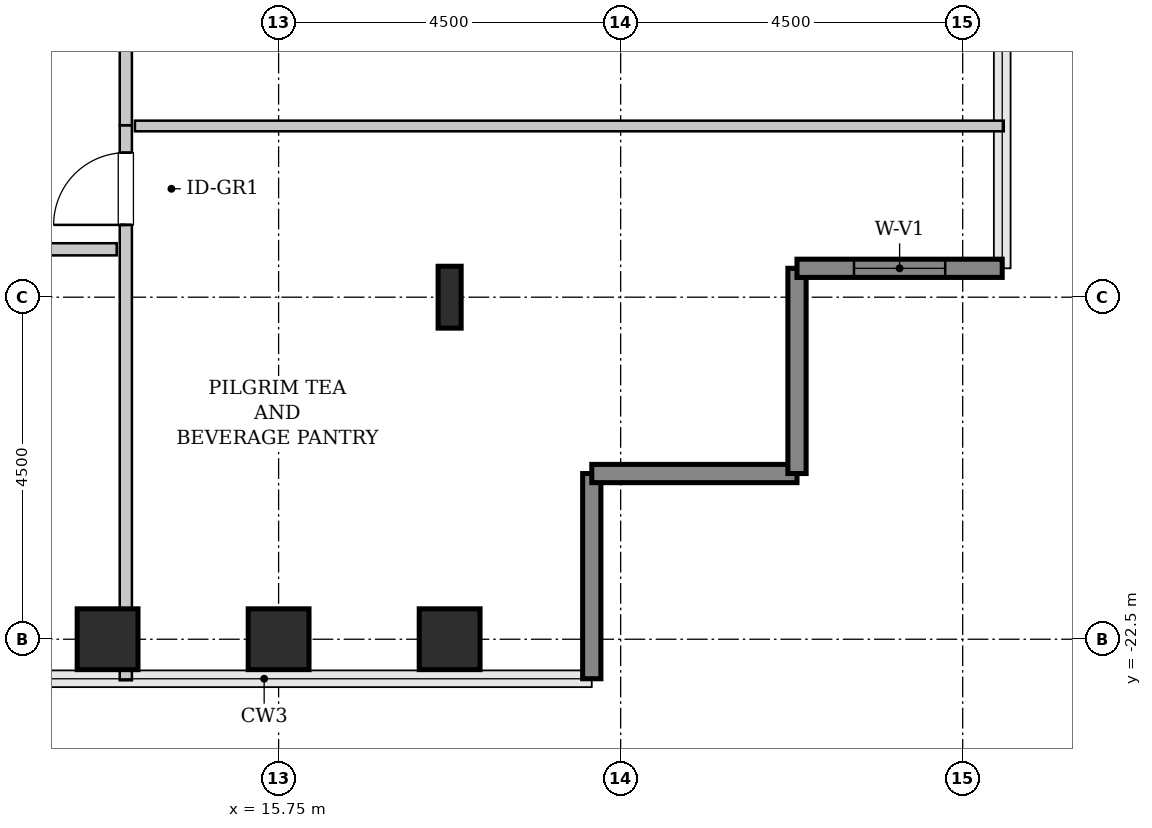
"""IFC4 building model, lengths in metres.
Left out: names, types, materials, properties, quantities, classifications, styles, units other than length and angle.
Written with IfcOpenShell. Run it as: python <this file> out.ifc"""

import sys

from ifc_helpers import new_model, si_unit, direction, frame, frame_2d, origin, origin_2d, place, context, subcontext, project, spatial, rectangle, hollow_rectangle, i_section, extrude, source, transform, mapped, element, fill, save


model = new_model("IFC4")
c1 = context("Model", 3, precision=1e-05, world=origin(), true_north=direction((0.0, 1.0)))
c2 = subcontext(c1, "Body", "Model", "MODEL_VIEW")
j1 = project(units=[si_unit("LENGTHUNIT", "METRE"), si_unit("PLANEANGLEUNIT", "RADIAN")], contexts=[c1])
p1 = place(None, origin())
s1 = spatial("IfcSite", under=j1, at=p1, CompositionType="ELEMENT")
p2 = place(p1, origin())
s2 = spatial("IfcBuilding", under=s1, at=p2, CompositionType="ELEMENT")
p3 = place(p2, frame((0.0, 0.0, 171.6)))
s3 = spatial("IfcBuildingStorey", under=s2, at=p3, CompositionType="ELEMENT", Elevation=171.6)
m1 = source(origin(), c2, "Body", "SweptSolid", [
    extrude(hollow_rectangle(XDim=0.8, YDim=0.8, WallThickness=0.04, InnerFilletRadius=0.04, OuterFilletRadius=0.08, at=origin_2d()), origin(), (0.0, 0.0, 1.0), 3.8),
])
for number, where, z_axis, x_axis in (
    (1, (13.5, -22.5, 0.0), (0.0, 0.0, 1.0), (1.0, 0.0, 0.0)),
    (2, (15.75, -22.5, 0.0), (0.0, 0.0, 1.0), (1.0, 0.0, 0.0)),
    (3, (18.0, -22.5, 0.0), (0.0, 0.0, 1.0), (1.0, 0.0, 0.0)),
):
    element("IfcColumn", number, at=place(p3, frame(where, z_axis=z_axis, x_axis=x_axis)), inside=s3, PredefinedType="COLUMN", context=c2, shape_type="MappedRepresentation", body=[
        mapped(m1, transform((0.0, 0.0, 0.0), x_axis=(1.0, 0.0, 0.0), y_axis=(0.0, 1.0, 0.0), z_axis=(0.0, 0.0, 1.0), scale=1.0)),
    ])
m2 = source(origin(), c2, "Body", "SweptSolid", [
    extrude(i_section(OverallWidth=0.303, OverallDepth=0.814, WebThickness=0.021, FlangeThickness=0.04, FilletRadius=0.03, at=origin_2d()), origin(), (0.0, 0.0, 1.0), 3.8),
])
p4 = place(p3, frame((18.0, -18.0, 0.0), z_axis=(0.0, 0.0, 1.0), x_axis=(1.0, 0.0, 0.0)))
e4 = element("IfcColumn", 4, at=p4, inside=s3, PredefinedType="COLUMN", context=c2, shape_type="MappedRepresentation", body=[
    mapped(m2, transform((0.0, 0.0, 0.0), x_axis=(1.0, 0.0, 0.0), y_axis=(0.0, 1.0, 0.0), z_axis=(0.0, 0.0, 1.0), scale=1.0)),
])
m3 = source(origin(), c2, "Body", "SweptSolid", [
    extrude(rectangle(XDim=2.7, YDim=0.24, at=frame_2d((1.35, 0.0))), origin(), (0.0, 0.0, 1.0), 3.55),
])
for number, where, z_axis, x_axis in (
    (5, (19.87, -23.02, 0.0), (0.0, 0.0, 1.0), (0.0, 1.0, 0.0)),
    (6, (19.87, -20.32, 0.0), (0.0, 0.0, 1.0), (1.0, 0.0, 0.0)),
    (7, (22.57, -20.32, 0.0), (0.0, 0.0, 1.0), (0.0, 1.0, 0.0)),
):
    element("IfcWall", number, at=place(p3, frame(where, z_axis=z_axis, x_axis=x_axis)), inside=s3, PredefinedType="SHEAR", context=c2, shape_type="MappedRepresentation", body=[
        mapped(m3, transform((0.0, 0.0, 0.0), x_axis=(1.0, 0.0, 0.0), y_axis=(0.0, 1.0, 0.0), z_axis=(0.0, 0.0, 1.0), scale=1.0)),
    ])
p5 = place(p3, frame((22.57, -17.62, 0.0), z_axis=(0.0, 0.0, 1.0), x_axis=(1.0, 0.0, 0.0)))
e8 = element("IfcWall", 8, at=p5, inside=s3, PredefinedType="SHEAR", context=c2, shape_type="MappedRepresentation", body=[
    mapped(m3, transform((0.0, 0.0, 0.0), x_axis=(1.0, 0.0, 0.0), y_axis=(0.0, 1.0, 0.0), z_axis=(0.0, 0.0, 1.0), scale=1.0)),
])
p6 = place(p5, frame((0.75, 0.0, 0.85)))
e9 = element("IfcOpeningElement", 9, at=p6, cuts=e8, PredefinedType="OPENING", context=c2, shape_type="SweptSolid", body=[
    extrude(rectangle(XDim=1.2, YDim=1.8, at=frame_2d((0.6, 0.9))), frame((0.0, 0.13, 0.0), z_axis=(0.0, -1.0, 0.0), x_axis=(1.0, 0.0, 0.0)), (0.0, 0.0, 1.0), 0.26),
])
m4 = source(origin(), c2, "Body", "SweptSolid", [
    extrude(rectangle(XDim=7.302, YDim=0.16, at=frame_2d((3.651, 0.0))), origin(), (0.0, 0.0, 1.0), 3.535),
])
p7 = place(p3, frame((13.74, -23.04, 0.0), z_axis=(0.0, 0.0, 1.0), x_axis=(0.0, 1.0, 0.0)))
e10 = element("IfcWall", 10, at=p7, inside=s3, PredefinedType="PARTITIONING", context=c2, shape_type="MappedRepresentation", body=[
    mapped(m4, transform((0.0, 0.0, 0.0), x_axis=(1.0, 0.0, 0.0), y_axis=(0.0, 1.0, 0.0), z_axis=(0.0, 0.0, 1.0), scale=1.0)),
])
p8 = place(p7, frame((5.991, 0.0, 0.0)))
e11 = element("IfcOpeningElement", 11, at=p8, cuts=e10, PredefinedType="OPENING", context=c2, shape_type="SweptSolid", body=[
    extrude(rectangle(XDim=0.95, YDim=2.1, at=frame_2d((0.475, 1.05))), frame((0.0, 0.09, 0.0), z_axis=(0.0, -1.0, 0.0), x_axis=(1.0, 0.0, 0.0)), (0.0, 0.0, 1.0), 0.18),
])
m5 = source(origin(), c2, "Body", "SweptSolid", [
    extrude(rectangle(XDim=11.43, YDim=0.14, at=frame_2d((5.715, 0.0))), origin(), (0.0, 0.0, 1.0), 3.535),
])
p9 = place(p3, frame((13.86, -15.748, 0.0), z_axis=(0.0, 0.0, 1.0), x_axis=(1.0, 0.0, 0.0)))
e12 = element("IfcWall", 12, at=p9, inside=s3, PredefinedType="PARTITIONING", context=c2, shape_type="MappedRepresentation", body=[
    mapped(m5, transform((0.0, 0.0, 0.0), x_axis=(1.0, 0.0, 0.0), y_axis=(0.0, 1.0, 0.0), z_axis=(0.0, 0.0, 1.0), scale=1.0)),
])
m6 = source(origin(), c2, "Body", "SweptSolid", [
    extrude(rectangle(XDim=7.242, YDim=0.16, at=frame_2d((3.621, 0.0))), origin(), (0.0, 0.0, 1.0), 3.535),
])
p10 = place(p3, frame((13.74, -15.738, 0.0), z_axis=(0.0, 0.0, 1.0), x_axis=(0.0, 1.0, 0.0)))
e13 = element("IfcWall", 13, at=p10, inside=s3, PredefinedType="PARTITIONING", context=c2, shape_type="MappedRepresentation", body=[
    mapped(m6, transform((0.0, 0.0, 0.0), x_axis=(1.0, 0.0, 0.0), y_axis=(0.0, 1.0, 0.0), z_axis=(0.0, 0.0, 1.0), scale=1.0)),
])
p11 = place(p10, frame((3.146, 0.0, 0.0)))
e14 = element("IfcOpeningElement", 14, at=p11, cuts=e13, PredefinedType="OPENING", context=c2, shape_type="SweptSolid", body=[
    extrude(rectangle(XDim=0.95, YDim=2.1, at=frame_2d((0.475, 1.05))), frame((0.0, 0.09, 0.0), z_axis=(0.0, -1.0, 0.0), x_axis=(1.0, 0.0, 0.0)), (0.0, 0.0, 1.0), 0.18),
])
m7 = source(origin(), c2, "Body", "SweptSolid", [
    extrude(rectangle(XDim=5.825, YDim=0.16, at=frame_2d((2.913, 0.0))), origin(), (0.0, 0.0, 1.0), 3.535),
])
p12 = place(p3, frame((7.795, -17.37, 0.0), z_axis=(0.0, 0.0, 1.0), x_axis=(1.0, 0.0, 0.0)))
e15 = element("IfcWall", 15, at=p12, inside=s3, PredefinedType="PARTITIONING", context=c2, shape_type="MappedRepresentation", body=[
    mapped(m7, transform((0.0, 0.0, 0.0), x_axis=(1.0, 0.0, 0.0), y_axis=(0.0, 1.0, 0.0), z_axis=(0.0, 0.0, 1.0), scale=1.0)),
])
p13 = place(p12, frame((2.092, 0.0, 0.0)))
e16 = element("IfcOpeningElement", 16, at=p13, cuts=e15, PredefinedType="OPENING", context=c2, shape_type="SweptSolid", body=[
    extrude(rectangle(XDim=0.95, YDim=2.1, at=frame_2d((0.475, 1.05))), frame((0.0, 0.09, 0.0), z_axis=(0.0, -1.0, 0.0), x_axis=(1.0, 0.0, 0.0)), (0.0, 0.0, 1.0), 0.18),
])
m8 = source(origin(), c2, "Body", "SweptSolid", [
    extrude(rectangle(XDim=1.2, YDim=1.8, at=frame_2d((0.6, 0.9))), frame((0.0, 0.03, 0.0), z_axis=(0.0, -1.0, 0.0), x_axis=(1.0, 0.0, 0.0)), (0.0, 0.0, 1.0), 0.06),
])
p14 = place(p6, origin())
e17 = element("IfcWindow", 17, at=p14, inside=s3, PartitioningType="SINGLE_PANEL", PredefinedType="WINDOW", context=c2, shape_type="MappedRepresentation", body=[
    mapped(m8, transform((0.0, 0.0, 0.0), x_axis=(1.0, 0.0, 0.0), y_axis=(0.0, 1.0, 0.0), z_axis=(0.0, 0.0, 1.0), scale=1.0)),
])
fill(e9, e17)
m9 = source(origin(), c2, "Body", "SweptSolid", [
    extrude(rectangle(XDim=0.95, YDim=2.1, at=frame_2d((0.475, 1.05))), frame((0.0, 0.025, 0.0), z_axis=(0.0, -1.0, 0.0), x_axis=(1.0, 0.0, 0.0)), (0.0, 0.0, 1.0), 0.05),
])
p15 = place(p8, origin())
e18 = element("IfcDoor", 18, at=p15, inside=s3, OperationType="SINGLE_SWING_LEFT", PredefinedType="DOOR", context=c2, shape_type="MappedRepresentation", body=[
    mapped(m9, transform((0.0, 0.0, 0.0), x_axis=(1.0, 0.0, 0.0), y_axis=(0.0, 1.0, 0.0), z_axis=(0.0, 0.0, 1.0), scale=1.0)),
])
fill(e11, e18)
save(model, sys.argv[1])
